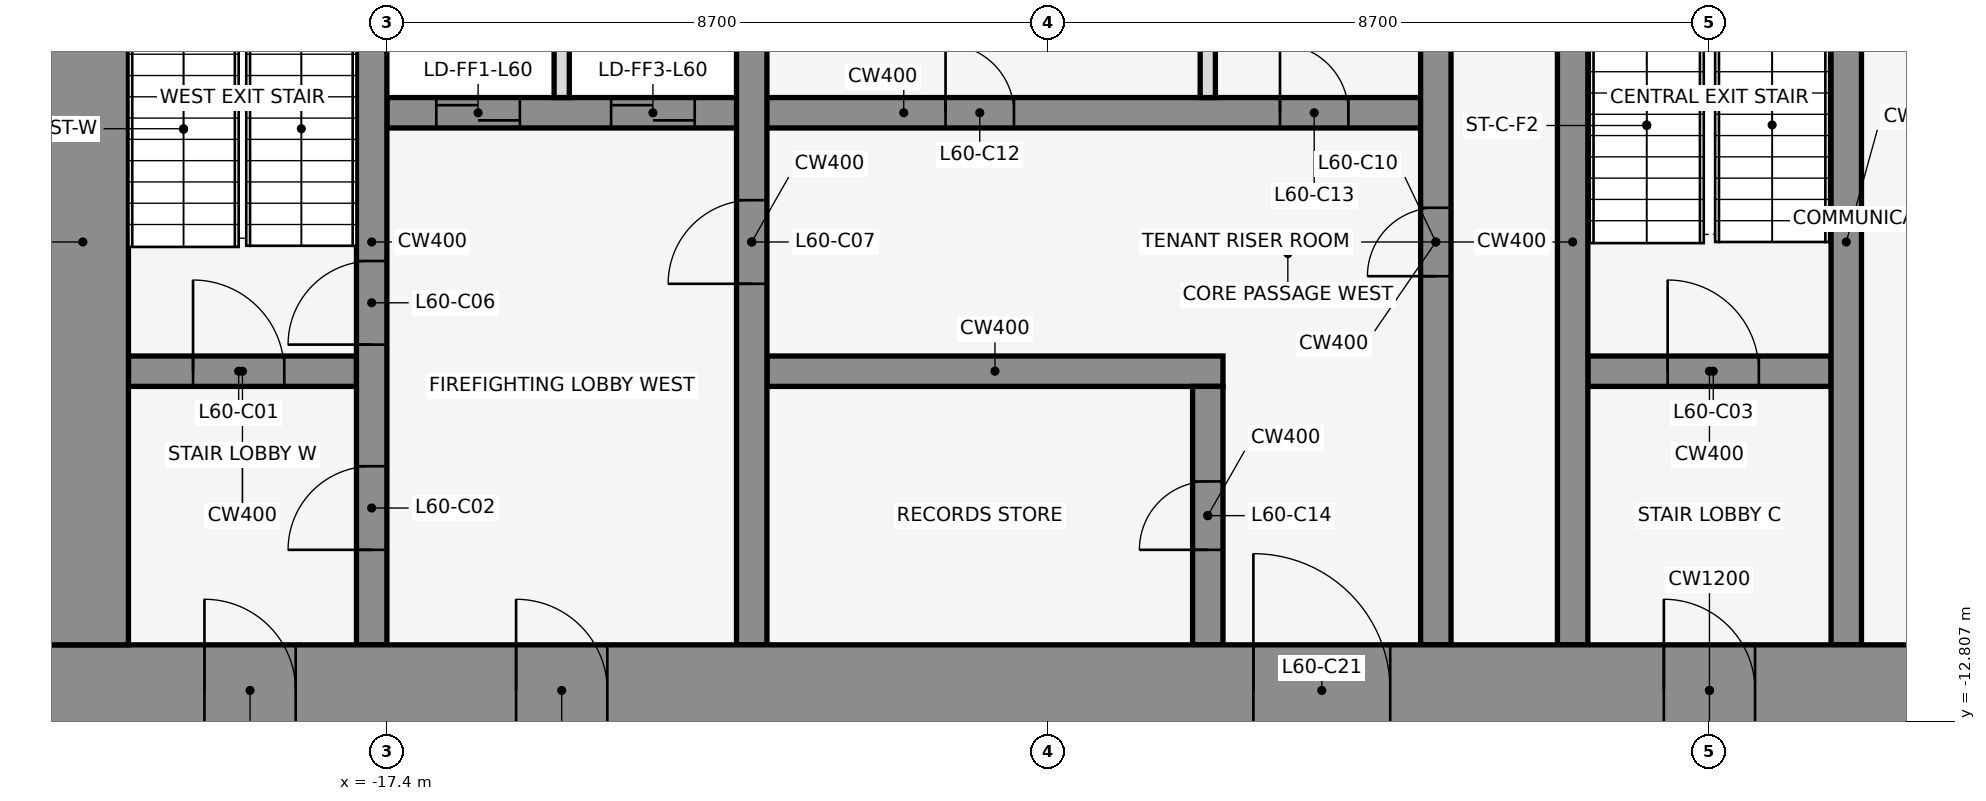
"""IFC4 building model, lengths in metres.
Left out: names, types, materials, properties, quantities, classifications, styles, units other than length and angle.
Written with IfcOpenShell. Run it as: python <this file> out.ifc"""

import sys

from ifc_helpers import new_model, si_unit, direction, frame, frame_2d, origin, place, context, subcontext, project, spatial, rectangle, extrude, element, fill, save


model = new_model("IFC4")
c1 = context("Model", 3, precision=1e-05, world=origin(), true_north=direction((0.0, 1.0)))
c2 = subcontext(c1, "Body", "Model", "MODEL_VIEW")
j1 = project(units=[si_unit("LENGTHUNIT", "METRE"), si_unit("PLANEANGLEUNIT", "RADIAN")], contexts=[c1])
p1 = place(None, origin())
s1 = spatial("IfcSite", under=j1, at=p1, CompositionType="ELEMENT")
p2 = place(p1, origin())
s2 = spatial("IfcBuilding", under=s1, at=p2, CompositionType="ELEMENT")
p3 = place(p2, frame((0.0, 0.0, 266.6)))
s3 = spatial("IfcBuildingStorey", under=s2, at=p3, CompositionType="ELEMENT", Elevation=266.6)
p4 = place(p3, frame((-20.8, -8.2, 0.0), z_axis=(0.0, 0.0, 1.0), x_axis=(1.0, 0.0, 0.0)))
e1 = element("IfcWall", 1, at=p4, inside=s3, PredefinedType="SHEAR", context=c2, shape_type="SweptSolid", body=[
    extrude(rectangle(XDim=3.0, YDim=0.4, at=frame_2d((1.5, 0.0))), origin(), (0.0, 0.0, 1.0), 4.2),
])
p5 = place(p4, frame((0.85, 0.0, 0.0)))
e2 = element("IfcOpeningElement", 2, at=p5, cuts=e1, PredefinedType="OPENING", context=c2, shape_type="SweptSolid", body=[
    extrude(rectangle(XDim=1.2, YDim=2.1, at=frame_2d((0.6, 1.05))), frame((0.0, 0.212, 0.0), z_axis=(0.0, -1.0, 0.0), x_axis=(1.0, 0.0, 0.0)), (0.0, 0.0, 1.0), 0.424),
])
p6 = place(p3, frame((-12.4, -8.2, 0.0), z_axis=(0.0, 0.0, 1.0), x_axis=(1.0, 0.0, 0.0)))
e3 = element("IfcWall", 3, at=p6, inside=s3, PredefinedType="SHEAR", context=c2, shape_type="SweptSolid", body=[
    extrude(rectangle(XDim=6.0, YDim=0.4, at=frame_2d((3.0, 0.0))), origin(), (0.0, 0.0, 1.0), 4.2),
])
p7 = place(p3, frame((-1.6, -8.2, 0.0), z_axis=(0.0, 0.0, 1.0), x_axis=(1.0, 0.0, 0.0)))
e4 = element("IfcWall", 4, at=p7, inside=s3, PredefinedType="SHEAR", context=c2, shape_type="SweptSolid", body=[
    extrude(rectangle(XDim=3.2, YDim=0.4, at=frame_2d((1.6, 0.0))), origin(), (0.0, 0.0, 1.0), 4.2),
])
p8 = place(p7, frame((1.05, 0.0, 0.0)))
e5 = element("IfcOpeningElement", 5, at=p8, cuts=e4, PredefinedType="OPENING", context=c2, shape_type="SweptSolid", body=[
    extrude(rectangle(XDim=1.2, YDim=2.1, at=frame_2d((0.6, 1.05))), frame((0.0, 0.212, 0.0), z_axis=(0.0, -1.0, 0.0), x_axis=(1.0, 0.0, 0.0)), (0.0, 0.0, 1.0), 0.424),
])
p9 = place(p3, frame((-17.4, -4.8, 0.0), z_axis=(0.0, 0.0, 1.0), x_axis=(1.0, 0.0, 0.0)))
e6 = element("IfcWall", 6, at=p9, inside=s3, PredefinedType="SHEAR", context=c2, shape_type="SweptSolid", body=[
    extrude(rectangle(XDim=13.6, YDim=0.4, at=frame_2d((6.8, 0.0))), origin(), (0.0, 0.0, 1.0), 4.2),
])
p10 = place(p9, frame((0.65, 0.0, 0.0)))
e7 = element("IfcOpeningElement", 7, at=p10, cuts=e6, PredefinedType="OPENING", context=c2, shape_type="SweptSolid", body=[
    extrude(rectangle(XDim=1.1, YDim=2.1, at=frame_2d((0.55, 1.05))), frame((0.0, 0.212, 0.0), z_axis=(0.0, -1.0, 0.0), x_axis=(1.0, 0.0, 0.0)), (0.0, 0.0, 1.0), 0.424),
])
p11 = place(p9, frame((2.95, 0.0, 0.0)))
e8 = element("IfcOpeningElement", 8, at=p11, cuts=e6, PredefinedType="OPENING", context=c2, shape_type="SweptSolid", body=[
    extrude(rectangle(XDim=1.1, YDim=2.1, at=frame_2d((0.55, 1.05))), frame((0.0, 0.212, 0.0), z_axis=(0.0, -1.0, 0.0), x_axis=(1.0, 0.0, 0.0)), (0.0, 0.0, 1.0), 0.424),
])
p12 = place(p9, frame((7.35, 0.0, 0.0)))
e9 = element("IfcOpeningElement", 9, at=p12, cuts=e6, PredefinedType="OPENING", context=c2, shape_type="SweptSolid", body=[
    extrude(rectangle(XDim=0.9, YDim=2.1, at=frame_2d((0.45, 1.05))), frame((0.0, 0.212, 0.0), z_axis=(0.0, -1.0, 0.0), x_axis=(1.0, 0.0, 0.0)), (0.0, 0.0, 1.0), 0.424),
])
p13 = place(p9, frame((11.75, 0.0, 0.0)))
e10 = element("IfcOpeningElement", 10, at=p13, cuts=e6, PredefinedType="OPENING", context=c2, shape_type="SweptSolid", body=[
    extrude(rectangle(XDim=0.9, YDim=2.1, at=frame_2d((0.45, 1.05))), frame((0.0, 0.212, 0.0), z_axis=(0.0, -1.0, 0.0), x_axis=(1.0, 0.0, 0.0)), (0.0, 0.0, 1.0), 0.424),
])
p14 = place(p3, frame((-17.6, -11.8, 0.0), z_axis=(0.0, 0.0, 1.0), x_axis=(0.0, 1.0, 0.0)))
e11 = element("IfcWall", 11, at=p14, inside=s3, PredefinedType="SHEAR", context=c2, shape_type="SweptSolid", body=[
    extrude(rectangle(XDim=10.6, YDim=0.4, at=frame_2d((5.3, 0.0))), origin(), (0.0, 0.0, 1.0), 4.2),
])
p15 = place(p14, frame((1.25, 0.0, 0.0)))
e12 = element("IfcOpeningElement", 12, at=p15, cuts=e11, PredefinedType="OPENING", context=c2, shape_type="SweptSolid", body=[
    extrude(rectangle(XDim=1.1, YDim=2.1, at=frame_2d((0.55, 1.05))), frame((0.0, 0.212, 0.0), z_axis=(0.0, -1.0, 0.0), x_axis=(1.0, 0.0, 0.0)), (0.0, 0.0, 1.0), 0.424),
])
p16 = place(p14, frame((3.95, 0.0, 0.0)))
e13 = element("IfcOpeningElement", 13, at=p16, cuts=e11, PredefinedType="OPENING", context=c2, shape_type="SweptSolid", body=[
    extrude(rectangle(XDim=1.1, YDim=2.1, at=frame_2d((0.55, 1.05))), frame((0.0, 0.212, 0.0), z_axis=(0.0, -1.0, 0.0), x_axis=(1.0, 0.0, 0.0)), (0.0, 0.0, 1.0), 0.424),
])
p17 = place(p3, frame((-15.1, -4.6, 0.0), z_axis=(0.0, 0.0, 1.0), x_axis=(0.0, 1.0, 0.0)))
e14 = element("IfcWall", 14, at=p17, inside=s3, PredefinedType="PARTITIONING", context=c2, shape_type="SweptSolid", body=[
    extrude(rectangle(XDim=3.4, YDim=0.2, at=frame_2d((1.7, 0.0))), origin(), (0.0, 0.0, 1.0), 3.118),
])
p18 = place(p3, frame((-12.6, -11.8, 0.0), z_axis=(0.0, 0.0, 1.0), x_axis=(0.0, 1.0, 0.0)))
e15 = element("IfcWall", 15, at=p18, inside=s3, PredefinedType="SHEAR", context=c2, shape_type="SweptSolid", body=[
    extrude(rectangle(XDim=10.6, YDim=0.4, at=frame_2d((5.3, 0.0))), origin(), (0.0, 0.0, 1.0), 4.2),
])
p19 = place(p18, frame((4.75, 0.0, 0.0)))
e16 = element("IfcOpeningElement", 16, at=p19, cuts=e15, PredefinedType="OPENING", context=c2, shape_type="SweptSolid", body=[
    extrude(rectangle(XDim=1.1, YDim=2.1, at=frame_2d((0.55, 1.05))), frame((0.0, 0.212, 0.0), z_axis=(0.0, -1.0, 0.0), x_axis=(1.0, 0.0, 0.0)), (0.0, 0.0, 1.0), 0.424),
])
p20 = place(p3, frame((-6.6, -11.8, 0.0), z_axis=(0.0, 0.0, 1.0), x_axis=(0.0, 1.0, 0.0)))
e17 = element("IfcWall", 17, at=p20, inside=s3, PredefinedType="SHEAR", context=c2, shape_type="SweptSolid", body=[
    extrude(rectangle(XDim=3.4, YDim=0.4, at=frame_2d((1.7, 0.0))), origin(), (0.0, 0.0, 1.0), 4.2),
])
p21 = place(p20, frame((1.25, 0.0, 0.0)))
e18 = element("IfcOpeningElement", 18, at=p21, cuts=e17, PredefinedType="OPENING", context=c2, shape_type="SweptSolid", body=[
    extrude(rectangle(XDim=0.9, YDim=2.1, at=frame_2d((0.45, 1.05))), frame((0.0, 0.212, 0.0), z_axis=(0.0, -1.0, 0.0), x_axis=(1.0, 0.0, 0.0)), (0.0, 0.0, 1.0), 0.424),
])
p22 = place(p3, frame((-6.6, -4.6, 0.0), z_axis=(0.0, 0.0, 1.0), x_axis=(0.0, 1.0, 0.0)))
e19 = element("IfcWall", 19, at=p22, inside=s3, PredefinedType="PARTITIONING", context=c2, shape_type="SweptSolid", body=[
    extrude(rectangle(XDim=3.4, YDim=0.2, at=frame_2d((1.7, 0.0))), origin(), (0.0, 0.0, 1.0), 3.118),
])
p23 = place(p3, frame((-3.6, -11.8, 0.0), z_axis=(0.0, 0.0, 1.0), x_axis=(0.0, 1.0, 0.0)))
e20 = element("IfcWall", 20, at=p23, inside=s3, PredefinedType="SHEAR", context=c2, shape_type="SweptSolid", body=[
    extrude(rectangle(XDim=10.6, YDim=0.4, at=frame_2d((5.3, 0.0))), origin(), (0.0, 0.0, 1.0), 4.2),
])
p24 = place(p23, frame((4.85, 0.0, 0.0)))
e21 = element("IfcOpeningElement", 21, at=p24, cuts=e20, PredefinedType="OPENING", context=c2, shape_type="SweptSolid", body=[
    extrude(rectangle(XDim=0.9, YDim=2.1, at=frame_2d((0.45, 1.05))), frame((0.0, 0.212, 0.0), z_axis=(0.0, -1.0, 0.0), x_axis=(1.0, 0.0, 0.0)), (0.0, 0.0, 1.0), 0.424),
])
for number, where, z_axis, x_axis in (
    (22, (-1.8, -11.8, 0.0), (0.0, 0.0, 1.0), (0.0, 1.0, 0.0)),
    (23, (1.8, -11.8, 0.0), (0.0, 0.0, 1.0), (0.0, 1.0, 0.0)),
):
    element("IfcWall", number, at=place(p3, frame(where, z_axis=z_axis, x_axis=x_axis)), inside=s3, PredefinedType="SHEAR", context=c2, shape_type="SweptSolid", body=[
        extrude(rectangle(XDim=10.6, YDim=0.4, at=frame_2d((5.3, 0.0))), origin(), (0.0, 0.0, 1.0), 4.2),
    ])
p25 = place(p3, frame((-22.0, -12.4, 0.0), z_axis=(0.0, 0.0, 1.0), x_axis=(1.0, 0.0, 0.0)))
e24 = element("IfcWall", 24, at=p25, inside=s3, PredefinedType="SHEAR", context=c2, shape_type="SweptSolid", body=[
    extrude(rectangle(XDim=44.0, YDim=1.2, at=frame_2d((22.0, 0.0))), origin(), (0.0, 0.0, 1.0), 4.2),
])
p26 = place(p25, frame((2.2, 0.0, 0.0)))
e25 = element("IfcOpeningElement", 25, at=p26, cuts=e24, PredefinedType="OPENING", context=c2, shape_type="SweptSolid", body=[
    extrude(rectangle(XDim=1.2, YDim=2.1, at=frame_2d((0.6, 1.05))), frame((0.0, 0.612, 0.0), z_axis=(0.0, -1.0, 0.0), x_axis=(1.0, 0.0, 0.0)), (0.0, 0.0, 1.0), 1.224),
])
p27 = place(p25, frame((21.4, 0.0, 0.0)))
e26 = element("IfcOpeningElement", 26, at=p27, cuts=e24, PredefinedType="OPENING", context=c2, shape_type="SweptSolid", body=[
    extrude(rectangle(XDim=1.2, YDim=2.1, at=frame_2d((0.6, 1.05))), frame((0.0, 0.612, 0.0), z_axis=(0.0, -1.0, 0.0), x_axis=(1.0, 0.0, 0.0)), (0.0, 0.0, 1.0), 1.224),
])
p28 = place(p25, frame((40.6, 0.0, 0.0)))
e27 = element("IfcOpeningElement", 27, at=p28, cuts=e24, PredefinedType="OPENING", context=c2, shape_type="SweptSolid", body=[
    extrude(rectangle(XDim=1.2, YDim=2.1, at=frame_2d((0.6, 1.05))), frame((0.0, 0.612, 0.0), z_axis=(0.0, -1.0, 0.0), x_axis=(1.0, 0.0, 0.0)), (0.0, 0.0, 1.0), 1.224),
])
p29 = place(p25, frame((16.0, 0.0, 0.0)))
e28 = element("IfcOpeningElement", 28, at=p29, cuts=e24, PredefinedType="OPENING", context=c2, shape_type="SweptSolid", body=[
    extrude(rectangle(XDim=1.8, YDim=2.1, at=frame_2d((0.9, 1.05))), frame((0.0, 0.612, 0.0), z_axis=(0.0, -1.0, 0.0), x_axis=(1.0, 0.0, 0.0)), (0.0, 0.0, 1.0), 1.224),
])
p30 = place(p25, frame((6.3, 0.0, 0.0)))
e29 = element("IfcOpeningElement", 29, at=p30, cuts=e24, PredefinedType="OPENING", context=c2, shape_type="SweptSolid", body=[
    extrude(rectangle(XDim=1.2, YDim=2.1, at=frame_2d((0.6, 1.05))), frame((0.0, 0.612, 0.0), z_axis=(0.0, -1.0, 0.0), x_axis=(1.0, 0.0, 0.0)), (0.0, 0.0, 1.0), 1.224),
])
p31 = place(p25, frame((26.2, 0.0, 0.0)))
e30 = element("IfcOpeningElement", 30, at=p31, cuts=e24, PredefinedType="OPENING", context=c2, shape_type="SweptSolid", body=[
    extrude(rectangle(XDim=1.8, YDim=2.1, at=frame_2d((0.9, 1.05))), frame((0.0, 0.612, 0.0), z_axis=(0.0, -1.0, 0.0), x_axis=(1.0, 0.0, 0.0)), (0.0, 0.0, 1.0), 1.224),
])
p32 = place(p25, frame((36.5, 0.0, 0.0)))
e31 = element("IfcOpeningElement", 31, at=p32, cuts=e24, PredefinedType="OPENING", context=c2, shape_type="SweptSolid", body=[
    extrude(rectangle(XDim=1.2, YDim=2.1, at=frame_2d((0.6, 1.05))), frame((0.0, 0.612, 0.0), z_axis=(0.0, -1.0, 0.0), x_axis=(1.0, 0.0, 0.0)), (0.0, 0.0, 1.0), 1.224),
])
p33 = place(p3, frame((-21.4, -11.8, 0.0), z_axis=(0.0, 0.0, 1.0), x_axis=(0.0, 1.0, 0.0)))
e32 = element("IfcWall", 32, at=p33, inside=s3, PredefinedType="SHEAR", context=c2, shape_type="SweptSolid", body=[
    extrude(rectangle(XDim=10.6, YDim=1.2, at=frame_2d((5.3, 0.0))), origin(), (0.0, 0.0, 1.0), 4.2),
])
p34 = place(p5, origin())
e33 = element("IfcDoor", 33, at=p34, inside=s3, OperationType="SINGLE_SWING_LEFT", PredefinedType="DOOR", context=c2, shape_type="SweptSolid", body=[
    extrude(rectangle(XDim=1.2, YDim=2.1, at=frame_2d((0.6, 1.05))), frame((0.0, 0.025, 0.0), z_axis=(0.0, -1.0, 0.0), x_axis=(1.0, 0.0, 0.0)), (0.0, 0.0, 1.0), 0.05),
])
fill(e2, e33)
p35 = place(p15, frame((1.1, 0.0, 0.0), z_axis=(0.0, 0.0, 1.0), x_axis=(-1.0, 0.0, 0.0)))
e34 = element("IfcDoor", 34, at=p35, inside=s3, OperationType="SINGLE_SWING_LEFT", PredefinedType="DOOR", context=c2, shape_type="SweptSolid", body=[
    extrude(rectangle(XDim=1.1, YDim=2.1, at=frame_2d((0.55, 1.05))), frame((0.0, 0.025, 0.0), z_axis=(0.0, -1.0, 0.0), x_axis=(1.0, 0.0, 0.0)), (0.0, 0.0, 1.0), 0.05),
])
fill(e12, e34)
p36 = place(p8, origin())
e35 = element("IfcDoor", 35, at=p36, inside=s3, OperationType="SINGLE_SWING_LEFT", PredefinedType="DOOR", context=c2, shape_type="SweptSolid", body=[
    extrude(rectangle(XDim=1.2, YDim=2.1, at=frame_2d((0.6, 1.05))), frame((0.0, 0.025, 0.0), z_axis=(0.0, -1.0, 0.0), x_axis=(1.0, 0.0, 0.0)), (0.0, 0.0, 1.0), 0.05),
])
fill(e5, e35)
p37 = place(p10, origin())
e36 = element("IfcDoor", 36, at=p37, inside=s3, OperationType="DOUBLE_DOOR_SLIDING", PredefinedType="DOOR", context=c2, shape_type="SweptSolid", body=[
    extrude(rectangle(XDim=1.1, YDim=2.1, at=frame_2d((0.55, 1.05))), frame((0.0, 0.025, 0.0), z_axis=(0.0, -1.0, 0.0), x_axis=(1.0, 0.0, 0.0)), (0.0, 0.0, 1.0), 0.05),
])
fill(e7, e36)
p38 = place(p11, origin())
e37 = element("IfcDoor", 37, at=p38, inside=s3, OperationType="DOUBLE_DOOR_SLIDING", PredefinedType="DOOR", context=c2, shape_type="SweptSolid", body=[
    extrude(rectangle(XDim=1.1, YDim=2.1, at=frame_2d((0.55, 1.05))), frame((0.0, 0.025, 0.0), z_axis=(0.0, -1.0, 0.0), x_axis=(1.0, 0.0, 0.0)), (0.0, 0.0, 1.0), 0.05),
])
fill(e8, e37)
p39 = place(p16, frame((1.1, 0.0, 0.0), z_axis=(0.0, 0.0, 1.0), x_axis=(-1.0, 0.0, 0.0)))
e38 = element("IfcDoor", 38, at=p39, inside=s3, OperationType="SINGLE_SWING_LEFT", PredefinedType="DOOR", context=c2, shape_type="SweptSolid", body=[
    extrude(rectangle(XDim=1.1, YDim=2.1, at=frame_2d((0.55, 1.05))), frame((0.0, 0.025, 0.0), z_axis=(0.0, -1.0, 0.0), x_axis=(1.0, 0.0, 0.0)), (0.0, 0.0, 1.0), 0.05),
])
fill(e13, e38)
p40 = place(p19, origin())
e39 = element("IfcDoor", 39, at=p40, inside=s3, OperationType="SINGLE_SWING_LEFT", PredefinedType="DOOR", context=c2, shape_type="SweptSolid", body=[
    extrude(rectangle(XDim=1.1, YDim=2.1, at=frame_2d((0.55, 1.05))), frame((0.0, 0.025, 0.0), z_axis=(0.0, -1.0, 0.0), x_axis=(1.0, 0.0, 0.0)), (0.0, 0.0, 1.0), 0.05),
])
fill(e16, e39)
p41 = place(p24, frame((0.9, 0.0, 0.0), z_axis=(0.0, 0.0, 1.0), x_axis=(-1.0, 0.0, 0.0)))
e40 = element("IfcDoor", 40, at=p41, inside=s3, OperationType="SINGLE_SWING_LEFT", PredefinedType="DOOR", context=c2, shape_type="SweptSolid", body=[
    extrude(rectangle(XDim=0.9, YDim=2.1, at=frame_2d((0.45, 1.05))), frame((0.0, 0.025, 0.0), z_axis=(0.0, -1.0, 0.0), x_axis=(1.0, 0.0, 0.0)), (0.0, 0.0, 1.0), 0.05),
])
fill(e21, e40)
p42 = place(p12, origin())
e41 = element("IfcDoor", 41, at=p42, inside=s3, OperationType="SINGLE_SWING_RIGHT", PredefinedType="DOOR", context=c2, shape_type="SweptSolid", body=[
    extrude(rectangle(XDim=0.9, YDim=2.1, at=frame_2d((0.45, 1.05))), frame((0.0, 0.025, 0.0), z_axis=(0.0, -1.0, 0.0), x_axis=(1.0, 0.0, 0.0)), (0.0, 0.0, 1.0), 0.05),
])
fill(e9, e41)
p43 = place(p13, origin())
e42 = element("IfcDoor", 42, at=p43, inside=s3, OperationType="SINGLE_SWING_LEFT", PredefinedType="DOOR", context=c2, shape_type="SweptSolid", body=[
    extrude(rectangle(XDim=0.9, YDim=2.1, at=frame_2d((0.45, 1.05))), frame((0.0, 0.025, 0.0), z_axis=(0.0, -1.0, 0.0), x_axis=(1.0, 0.0, 0.0)), (0.0, 0.0, 1.0), 0.05),
])
fill(e10, e42)
p44 = place(p21, origin())
e43 = element("IfcDoor", 43, at=p44, inside=s3, OperationType="SINGLE_SWING_RIGHT", PredefinedType="DOOR", context=c2, shape_type="SweptSolid", body=[
    extrude(rectangle(XDim=0.9, YDim=2.1, at=frame_2d((0.45, 1.05))), frame((0.0, 0.025, 0.0), z_axis=(0.0, -1.0, 0.0), x_axis=(1.0, 0.0, 0.0)), (0.0, 0.0, 1.0), 0.05),
])
fill(e18, e43)
p45 = place(p26, frame((1.2, 0.0, 0.0), z_axis=(0.0, 0.0, 1.0), x_axis=(-1.0, 0.0, 0.0)))
e44 = element("IfcDoor", 44, at=p45, inside=s3, OperationType="SINGLE_SWING_RIGHT", PredefinedType="DOOR", context=c2, shape_type="SweptSolid", body=[
    extrude(rectangle(XDim=1.2, YDim=2.1, at=frame_2d((0.6, 1.05))), frame((0.0, 0.025, 0.0), z_axis=(0.0, -1.0, 0.0), x_axis=(1.0, 0.0, 0.0)), (0.0, 0.0, 1.0), 0.05),
])
fill(e25, e44)
p46 = place(p27, frame((1.2, 0.0, 0.0), z_axis=(0.0, 0.0, 1.0), x_axis=(-1.0, 0.0, 0.0)))
e45 = element("IfcDoor", 45, at=p46, inside=s3, OperationType="SINGLE_SWING_RIGHT", PredefinedType="DOOR", context=c2, shape_type="SweptSolid", body=[
    extrude(rectangle(XDim=1.2, YDim=2.1, at=frame_2d((0.6, 1.05))), frame((0.0, 0.025, 0.0), z_axis=(0.0, -1.0, 0.0), x_axis=(1.0, 0.0, 0.0)), (0.0, 0.0, 1.0), 0.05),
])
fill(e26, e45)
p47 = place(p29, origin())
e46 = element("IfcDoor", 46, at=p47, inside=s3, OperationType="SINGLE_SWING_LEFT", PredefinedType="DOOR", context=c2, shape_type="SweptSolid", body=[
    extrude(rectangle(XDim=1.8, YDim=2.1, at=frame_2d((0.9, 1.05))), frame((0.0, 0.025, 0.0), z_axis=(0.0, -1.0, 0.0), x_axis=(1.0, 0.0, 0.0)), (0.0, 0.0, 1.0), 0.05),
])
fill(e28, e46)
p48 = place(p30, frame((1.2, 0.0, 0.0), z_axis=(0.0, 0.0, 1.0), x_axis=(-1.0, 0.0, 0.0)))
e47 = element("IfcDoor", 47, at=p48, inside=s3, OperationType="SINGLE_SWING_RIGHT", PredefinedType="DOOR", context=c2, shape_type="SweptSolid", body=[
    extrude(rectangle(XDim=1.2, YDim=2.1, at=frame_2d((0.6, 1.05))), frame((0.0, 0.025, 0.0), z_axis=(0.0, -1.0, 0.0), x_axis=(1.0, 0.0, 0.0)), (0.0, 0.0, 1.0), 0.05),
])
fill(e29, e47)
save(model, sys.argv[1])
